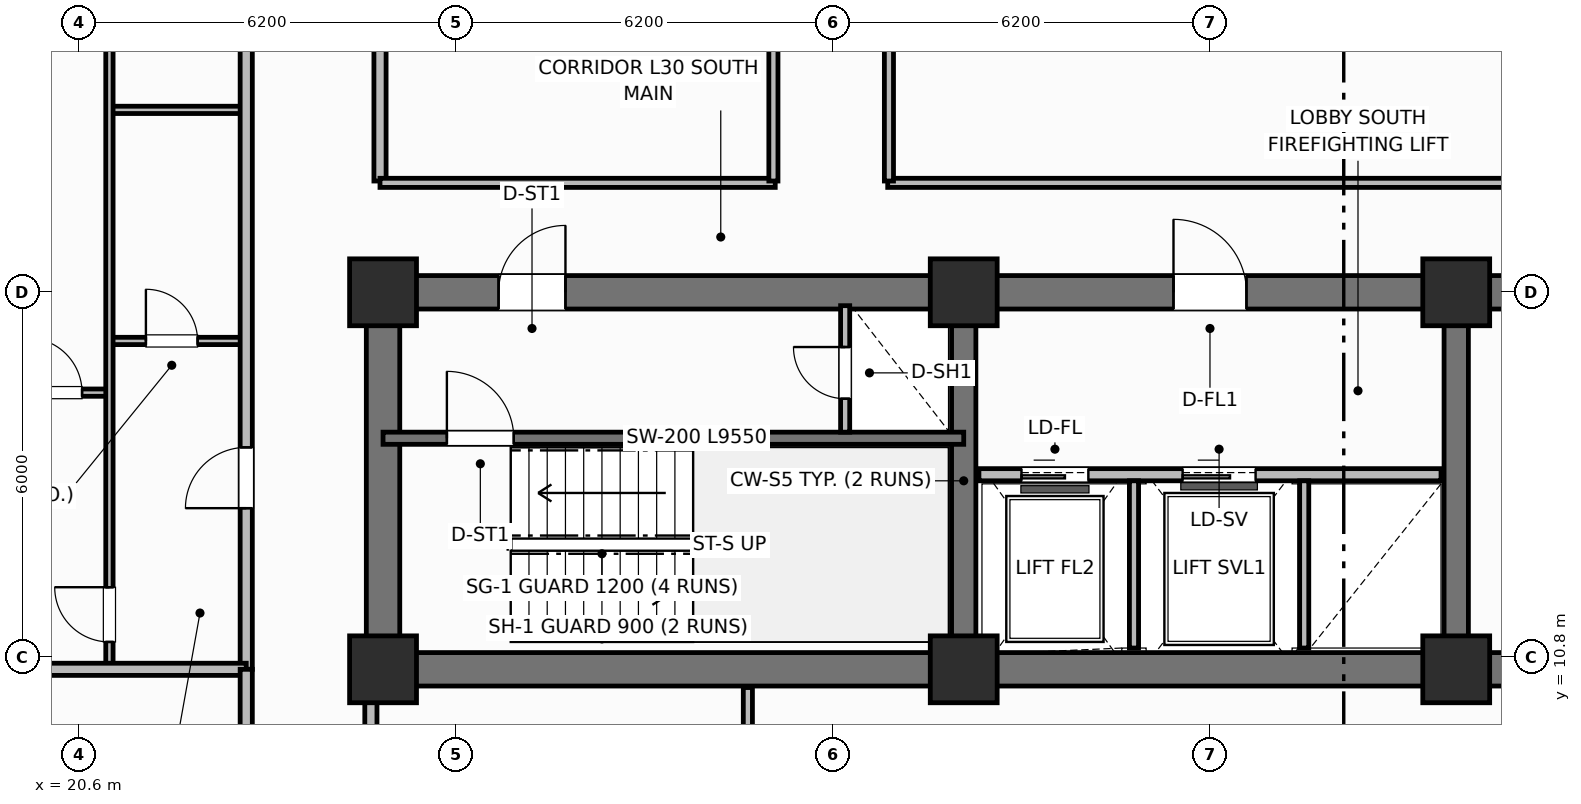
"""IFC4 building model, lengths in metres.
Left out: names, types, materials, properties, quantities, classifications, styles, units other than length and angle.
Written with IfcOpenShell. Run it as: python <this file> out.ifc"""

import sys

from ifc_helpers import new_model, si_unit, direction, frame, frame_2d, origin, origin_2d, place, context, subcontext, project, spatial, rectangle, extrude, element, fill, save


model = new_model("IFC4")
c1 = context("Model", 3, precision=1e-05, world=origin(), true_north=direction((0.0, 1.0)))
c2 = subcontext(c1, "Body", "Model", "MODEL_VIEW")
j1 = project(units=[si_unit("LENGTHUNIT", "METRE"), si_unit("PLANEANGLEUNIT", "RADIAN")], contexts=[c1])
p1 = place(None, origin())
s1 = spatial("IfcSite", under=j1, at=p1, CompositionType="ELEMENT")
p2 = place(p1, origin())
s2 = spatial("IfcBuilding", under=s1, at=p2, CompositionType="ELEMENT")
p3 = place(p2, frame((0.0, 0.0, 121.6)))
s3 = spatial("IfcBuildingStorey", under=s2, at=p3, CompositionType="ELEMENT", Elevation=121.6)
p4 = place(p3, frame((52.8, 10.6, 0.0), z_axis=(0.0, 0.0, 1.0), x_axis=(-1.0, 0.0, 0.0)))
e1 = element("IfcWall", 1, at=p4, inside=s3, PredefinedType="SHEAR", context=c2, shape_type="SweptSolid", body=[
    extrude(rectangle(XDim=27.2, YDim=0.55, at=frame_2d((13.6, 0.0))), origin(), (0.0, 0.0, 1.0), 3.7),
])
p5 = place(p3, frame((25.6, 10.875, 0.0), z_axis=(0.0, 0.0, 1.0), x_axis=(0.0, 1.0, 0.0)))
e2 = element("IfcWall", 2, at=p5, inside=s3, PredefinedType="SHEAR", context=c2, shape_type="SweptSolid", body=[
    extrude(rectangle(XDim=5.65, YDim=0.55, at=frame_2d((2.825, 0.0))), origin(), (0.0, 0.0, 1.0), 3.7),
])
p6 = place(p3, frame((25.6, 16.8, 0.0), z_axis=(0.0, 0.0, 1.0), x_axis=(1.0, 0.0, 0.0)))
e3 = element("IfcWall", 3, at=p6, inside=s3, PredefinedType="SHEAR", context=c2, shape_type="SweptSolid", body=[
    extrude(rectangle(XDim=27.2, YDim=0.55, at=frame_2d((13.6, 0.0))), origin(), (0.0, 0.0, 1.0), 3.7),
])
p7 = place(p6, frame((1.9, 0.0, 0.0)))
e4 = element("IfcOpeningElement", 4, at=p7, cuts=e3, PredefinedType="OPENING", context=c2, shape_type="SweptSolid", body=[
    extrude(rectangle(XDim=1.1, YDim=2.15, at=frame_2d((0.55, 1.075))), frame((0.0, 0.285, 0.0), z_axis=(0.0, -1.0, 0.0), x_axis=(1.0, 0.0, 0.0)), (0.0, 0.0, 1.0), 0.57),
])
p8 = place(p6, frame((13.0, 0.0, 0.0)))
e5 = element("IfcOpeningElement", 5, at=p8, cuts=e3, PredefinedType="OPENING", context=c2, shape_type="SweptSolid", body=[
    extrude(rectangle(XDim=1.2, YDim=2.15, at=frame_2d((0.6, 1.075))), frame((0.0, 0.285, 0.0), z_axis=(0.0, -1.0, 0.0), x_axis=(1.0, 0.0, 0.0)), (0.0, 0.0, 1.0), 0.57),
])
p9 = place(p6, frame((21.6, 0.0, 0.0)))
e6 = element("IfcOpeningElement", 6, at=p9, cuts=e3, PredefinedType="OPENING", context=c2, shape_type="SweptSolid", body=[
    extrude(rectangle(XDim=1.0, YDim=2.15, at=frame_2d((0.5, 1.075))), frame((0.0, 0.285, 0.0), z_axis=(0.0, -1.0, 0.0), x_axis=(1.0, 0.0, 0.0)), (0.0, 0.0, 1.0), 0.57),
])
for number, where, z_axis, x_axis in (
    (7, (35.15, 10.875, 0.0), (0.0, 0.0, 1.0), (0.0, 1.0, 0.0)),
    (8, (43.25, 10.875, 0.0), (0.0, 0.0, 1.0), (0.0, 1.0, 0.0)),
):
    element("IfcWall", number, at=place(p3, frame(where, z_axis=z_axis, x_axis=x_axis)), inside=s3, PredefinedType="SHEAR", context=c2, shape_type="SweptSolid", body=[
        extrude(rectangle(XDim=5.65, YDim=0.4, at=frame_2d((2.825, 0.0))), origin(), (0.0, 0.0, 1.0), 3.7),
    ])
for number, where, z_axis, x_axis in (
    (9, (25.6, 10.6, 0.0), (0.0, 0.0, 1.0), (1.0, 0.0, 0.0)),
    (10, (25.6, 16.8, 0.0), (0.0, 0.0, 1.0), (1.0, 0.0, 0.0)),
    (11, (35.15, 10.6, 0.0), (0.0, 0.0, 1.0), (1.0, 0.0, 0.0)),
    (12, (35.15, 16.8, 0.0), (0.0, 0.0, 1.0), (1.0, 0.0, 0.0)),
    (13, (43.25, 10.6, 0.0), (0.0, 0.0, 1.0), (1.0, 0.0, 0.0)),
    (14, (43.25, 16.8, 0.0), (0.0, 0.0, 1.0), (1.0, 0.0, 0.0)),
):
    element("IfcColumn", number, at=place(p3, frame(where, z_axis=z_axis, x_axis=x_axis)), inside=s3, PredefinedType="COLUMN", context=c2, shape_type="SweptSolid", body=[
        extrude(rectangle(XDim=1.1, YDim=1.1, at=origin_2d()), origin(), (0.0, 0.0, 1.0), 3.7),
    ])
p10 = place(p3, frame((25.6, 14.4, 0.0), z_axis=(0.0, 0.0, 1.0), x_axis=(1.0, 0.0, 0.0)))
e15 = element("IfcWall", 15, at=p10, inside=s3, PredefinedType="SHEAR", context=c2, shape_type="SweptSolid", body=[
    extrude(rectangle(XDim=9.55, YDim=0.2, at=frame_2d((4.775, 0.0))), origin(), (0.0, 0.0, 1.0), 3.7),
])
p11 = place(p10, frame((1.05, 0.0, 0.0)))
e16 = element("IfcOpeningElement", 16, at=p11, cuts=e15, PredefinedType="OPENING", context=c2, shape_type="SweptSolid", body=[
    extrude(rectangle(XDim=1.1, YDim=2.15, at=frame_2d((0.55, 1.075))), frame((0.0, 0.11, 0.0), z_axis=(0.0, -1.0, 0.0), x_axis=(1.0, 0.0, 0.0)), (0.0, 0.0, 1.0), 0.22),
])
p12 = place(p3, frame((33.2, 14.5, 0.0), z_axis=(0.0, 0.0, 1.0), x_axis=(0.0, 1.0, 0.0)))
e17 = element("IfcWall", 17, at=p12, inside=s3, PredefinedType="PARTITIONING", context=c2, shape_type="SweptSolid", body=[
    extrude(rectangle(XDim=2.08, YDim=0.15, at=frame_2d((1.04, 0.0))), origin(), (0.0, 0.0, 1.0), 2.53),
])
p13 = place(p12, frame((0.55, 0.0, 0.0)))
e18 = element("IfcOpeningElement", 18, at=p13, cuts=e17, PredefinedType="OPENING", context=c2, shape_type="SweptSolid", body=[
    extrude(rectangle(XDim=0.85, YDim=2.05, at=frame_2d((0.425, 1.025))), frame((0.0, 0.085, 0.0), z_axis=(0.0, -1.0, 0.0), x_axis=(1.0, 0.0, 0.0)), (0.0, 0.0, 1.0), 0.17),
])
p14 = place(p3, frame((35.4, 13.8, 0.0), z_axis=(0.0, 0.0, 1.0), x_axis=(1.0, 0.0, 0.0)))
e19 = element("IfcWall", 19, at=p14, inside=s3, PredefinedType="PARTITIONING", context=c2, shape_type="SweptSolid", body=[
    extrude(rectangle(XDim=7.6, YDim=0.2, at=frame_2d((3.8, 0.0))), origin(), (0.0, 0.0, 1.0), 2.3),
])
p15 = place(p14, frame((0.7, 0.0, 0.0)))
e20 = element("IfcOpeningElement", 20, at=p15, cuts=e19, PredefinedType="OPENING", context=c2, shape_type="SweptSolid", body=[
    extrude(rectangle(XDim=1.1, YDim=2.15, at=frame_2d((0.55, 1.075))), frame((0.0, 0.11, 0.0), z_axis=(0.0, -1.0, 0.0), x_axis=(1.0, 0.0, 0.0)), (0.0, 0.0, 1.0), 0.22),
])
p16 = place(p14, frame((3.35, 0.0, 0.0)))
e21 = element("IfcOpeningElement", 21, at=p16, cuts=e19, PredefinedType="OPENING", context=c2, shape_type="SweptSolid", body=[
    extrude(rectangle(XDim=1.2, YDim=2.15, at=frame_2d((0.6, 1.075))), frame((0.0, 0.11, 0.0), z_axis=(0.0, -1.0, 0.0), x_axis=(1.0, 0.0, 0.0)), (0.0, 0.0, 1.0), 0.22),
])
for number, where, z_axis, x_axis in (
    (22, (37.95, 10.95, 0.0), (0.0, 0.0, 1.0), (0.0, 1.0, 0.0)),
    (23, (40.75, 10.95, 0.0), (0.0, 0.0, 1.0), (0.0, 1.0, 0.0)),
):
    element("IfcWall", number, at=place(p3, frame(where, z_axis=z_axis, x_axis=x_axis)), inside=s3, PredefinedType="PARTITIONING", context=c2, shape_type="SweptSolid", body=[
        extrude(rectangle(XDim=2.75, YDim=0.15, at=frame_2d((1.375, 0.0))), origin(), (0.0, 0.0, 1.0), 2.53),
    ])
p17 = place(p3, frame((25.55, 18.63, 0.0), z_axis=(0.0, 0.0, 1.0), x_axis=(0.0, 1.0, 0.0)))
e24 = element("IfcWall", 24, at=p17, inside=s3, PredefinedType="PARTITIONING", context=c2, shape_type="SweptSolid", body=[
    extrude(rectangle(XDim=19.14, YDim=0.2, at=frame_2d((9.57, 0.0))), origin(), (0.0, 0.0, 1.0), 2.53),
])
p18 = place(p3, frame((25.55, 18.6, 0.0), z_axis=(0.0, 0.0, 1.0), x_axis=(1.0, 0.0, 0.0)))
e25 = element("IfcWall", 25, at=p18, inside=s3, PredefinedType="PARTITIONING", context=c2, shape_type="SweptSolid", body=[
    extrude(rectangle(XDim=6.5, YDim=0.15, at=frame_2d((3.25, 0.0))), origin(), (0.0, 0.0, 1.0), 2.53),
])
p19 = place(p3, frame((33.9, 18.6, 0.0), z_axis=(0.0, 0.0, 1.0), x_axis=(1.0, 0.0, 0.0)))
e26 = element("IfcWall", 26, at=p19, inside=s3, PredefinedType="PARTITIONING", context=c2, shape_type="SweptSolid", body=[
    extrude(rectangle(XDim=10.6, YDim=0.15, at=frame_2d((5.3, 0.0))), origin(), (0.0, 0.0, 1.0), 2.53),
])
p20 = place(p3, frame((32.02, 18.63, 0.0), z_axis=(0.0, 0.0, 1.0), x_axis=(0.0, 1.0, 0.0)))
e27 = element("IfcWall", 27, at=p20, inside=s3, PredefinedType="PARTITIONING", context=c2, shape_type="SweptSolid", body=[
    extrude(rectangle(XDim=19.14, YDim=0.15, at=frame_2d((9.57, 0.0))), origin(), (0.0, 0.0, 1.0), 2.53),
])
p21 = place(p20, frame((5.0, 0.0, 0.0)))
e28 = element("IfcOpeningElement", 28, at=p21, cuts=e27, PredefinedType="OPENING", context=c2, shape_type="SweptSolid", body=[
    extrude(rectangle(XDim=0.9, YDim=2.1, at=frame_2d((0.45, 1.05))), frame((0.0, 0.085, 0.0), z_axis=(0.0, -1.0, 0.0), x_axis=(1.0, 0.0, 0.0)), (0.0, 0.0, 1.0), 0.17),
])
p22 = place(p3, frame((33.92, 18.63, 0.0), z_axis=(0.0, 0.0, 1.0), x_axis=(0.0, 1.0, 0.0)))
e29 = element("IfcWall", 29, at=p22, inside=s3, PredefinedType="PARTITIONING", context=c2, shape_type="SweptSolid", body=[
    extrude(rectangle(XDim=19.14, YDim=0.15, at=frame_2d((9.57, 0.0))), origin(), (0.0, 0.0, 1.0), 2.53),
])
p23 = place(p22, frame((6.5, 0.0, 0.0)))
e30 = element("IfcOpeningElement", 30, at=p23, cuts=e29, PredefinedType="OPENING", context=c2, shape_type="SweptSolid", body=[
    extrude(rectangle(XDim=1.0, YDim=2.15, at=frame_2d((0.5, 1.075))), frame((0.0, 0.085, 0.0), z_axis=(0.0, -1.0, 0.0), x_axis=(1.0, 0.0, 0.0)), (0.0, 0.0, 1.0), 0.17),
])
p24 = place(p3, frame((21.1, 16.0, 0.0), z_axis=(0.0, 0.0, 1.0), x_axis=(1.0, 0.0, 0.0)))
e31 = element("IfcWall", 31, at=p24, inside=s3, PredefinedType="PARTITIONING", context=c2, shape_type="SweptSolid", body=[
    extrude(rectangle(XDim=2.25, YDim=0.12, at=frame_2d((1.125, 0.0))), origin(), (0.0, 0.0, 1.0), 2.53),
])
p25 = place(p24, frame((0.6, 0.0, 0.0)))
e32 = element("IfcOpeningElement", 32, at=p25, cuts=e31, PredefinedType="OPENING", context=c2, shape_type="SweptSolid", body=[
    extrude(rectangle(XDim=0.85, YDim=2.1, at=frame_2d((0.425, 1.05))), frame((0.0, 0.07, 0.0), z_axis=(0.0, -1.0, 0.0), x_axis=(1.0, 0.0, 0.0)), (0.0, 0.0, 1.0), 0.14),
])
p26 = place(p3, frame((21.1, 19.8, 0.0), z_axis=(0.0, 0.0, 1.0), x_axis=(1.0, 0.0, 0.0)))
e33 = element("IfcWall", 33, at=p26, inside=s3, PredefinedType="PARTITIONING", context=c2, shape_type="SweptSolid", body=[
    extrude(rectangle(XDim=2.25, YDim=0.12, at=frame_2d((1.125, 0.0))), origin(), (0.0, 0.0, 1.0), 2.53),
])
p27 = place(p3, frame((14.57, 15.15, 0.0), z_axis=(0.0, 0.0, 1.0), x_axis=(1.0, 0.0, 0.0)))
e34 = element("IfcWall", 34, at=p27, inside=s3, PredefinedType="PARTITIONING", context=c2, shape_type="SweptSolid", body=[
    extrude(rectangle(XDim=6.53, YDim=0.12, at=frame_2d((3.265, 0.0))), origin(), (0.0, 0.0, 1.0), 2.53),
])
p28 = place(p27, frame((5.18, 0.0, 0.0)))
e35 = element("IfcOpeningElement", 35, at=p28, cuts=e34, PredefinedType="OPENING", context=c2, shape_type="SweptSolid", body=[
    extrude(rectangle(XDim=0.9, YDim=2.1, at=frame_2d((0.45, 1.05))), frame((0.0, 0.07, 0.0), z_axis=(0.0, -1.0, 0.0), x_axis=(1.0, 0.0, 0.0)), (0.0, 0.0, 1.0), 0.14),
])
p29 = place(p3, frame((21.1, 10.64, 0.0), z_axis=(0.0, 0.0, 1.0), x_axis=(0.0, 1.0, 0.0)))
e36 = element("IfcWall", 36, at=p29, inside=s3, PredefinedType="PARTITIONING", context=c2, shape_type="SweptSolid", body=[
    extrude(rectangle(XDim=15.92, YDim=0.12, at=frame_2d((7.96, 0.0))), origin(), (0.0, 0.0, 1.0), 2.53),
])
p30 = place(p29, frame((0.41, 0.0, 0.0)))
e37 = element("IfcOpeningElement", 37, at=p30, cuts=e36, PredefinedType="OPENING", context=c2, shape_type="SweptSolid", body=[
    extrude(rectangle(XDim=0.9, YDim=2.1, at=frame_2d((0.45, 1.05))), frame((0.0, 0.07, 0.0), z_axis=(0.0, -1.0, 0.0), x_axis=(1.0, 0.0, 0.0)), (0.0, 0.0, 1.0), 0.14),
])
p31 = place(p29, frame((13.125, 0.0, 0.0)))
e38 = element("IfcOpeningElement", 38, at=p31, cuts=e36, PredefinedType="OPENING", context=c2, shape_type="SweptSolid", body=[
    extrude(rectangle(XDim=0.82, YDim=2.08, at=frame_2d((0.41, 1.04))), frame((0.0, 0.07, 0.0), z_axis=(0.0, -1.0, 0.0), x_axis=(1.0, 0.0, 0.0)), (0.0, 0.0, 1.0), 0.14),
])
p32 = place(p3, frame((23.35, 10.6, 0.0), z_axis=(0.0, 0.0, 1.0), x_axis=(0.0, 1.0, 0.0)))
e39 = element("IfcWall", 39, at=p32, inside=s3, PredefinedType="PARTITIONING", context=c2, shape_type="SweptSolid", body=[
    extrude(rectangle(XDim=35.2, YDim=0.2, at=frame_2d((17.6, 0.0))), origin(), (0.0, 0.0, 1.0), 2.53),
])
p33 = place(p32, frame((2.65, 0.0, 0.0)))
e40 = element("IfcOpeningElement", 40, at=p33, cuts=e39, PredefinedType="OPENING", context=c2, shape_type="SweptSolid", body=[
    extrude(rectangle(XDim=1.0, YDim=2.15, at=frame_2d((0.5, 1.075))), frame((0.0, 0.11, 0.0), z_axis=(0.0, -1.0, 0.0), x_axis=(1.0, 0.0, 0.0)), (0.0, 0.0, 1.0), 0.22),
])
p34 = place(p32, frame((19.95, 0.0, 0.0)))
e41 = element("IfcOpeningElement", 41, at=p34, cuts=e39, PredefinedType="OPENING", context=c2, shape_type="SweptSolid", body=[
    extrude(rectangle(XDim=1.0, YDim=2.15, at=frame_2d((0.5, 1.075))), frame((0.0, 0.11, 0.0), z_axis=(0.0, -1.0, 0.0), x_axis=(1.0, 0.0, 0.0)), (0.0, 0.0, 1.0), 0.22),
])
p35 = place(p3, frame((14.99, 10.6, 0.0), z_axis=(0.0, 0.0, 1.0), x_axis=(1.0, 0.0, 0.0)))
e42 = element("IfcWall", 42, at=p35, inside=s3, PredefinedType="PARTITIONING", context=c2, shape_type="SweptSolid", body=[
    extrude(rectangle(XDim=8.36, YDim=0.2, at=frame_2d((4.18, 0.0))), origin(), (0.0, 0.0, 1.0), 2.53),
])
p36 = place(p3, frame((23.35, 4.97, 0.0), z_axis=(0.0, 0.0, 1.0), x_axis=(0.0, 1.0, 0.0)))
e43 = element("IfcWall", 43, at=p36, inside=s3, PredefinedType="PARTITIONING", context=c2, shape_type="SweptSolid", body=[
    extrude(rectangle(XDim=5.63, YDim=0.2, at=frame_2d((2.815, 0.0))), origin(), (0.0, 0.0, 1.0), 2.53),
])
p37 = place(p3, frame((31.6, 4.97, 0.0), z_axis=(0.0, 0.0, 1.0), x_axis=(0.0, 1.0, 0.0)))
e44 = element("IfcWall", 44, at=p37, inside=s3, PredefinedType="PARTITIONING", context=c2, shape_type="SweptSolid", body=[
    extrude(rectangle(XDim=5.33, YDim=0.15, at=frame_2d((2.665, 0.0))), origin(), (0.0, 0.0, 1.0), 2.53),
])
p38 = place(p37, frame((1.45, 0.0, 0.0)))
e45 = element("IfcOpeningElement", 45, at=p38, cuts=e44, PredefinedType="OPENING", context=c2, shape_type="SweptSolid", body=[
    extrude(rectangle(XDim=0.9, YDim=2.1, at=frame_2d((0.45, 1.05))), frame((0.0, 0.085, 0.0), z_axis=(0.0, -1.0, 0.0), x_axis=(1.0, 0.0, 0.0)), (0.0, 0.0, 1.0), 0.17),
])
p39 = place(p3, frame((25.4, 5.77, 0.0), z_axis=(0.0, 0.0, 1.0), x_axis=(0.0, 1.0, 0.0)))
e46 = element("IfcWall", 46, at=p39, inside=s3, PredefinedType="PARTITIONING", context=c2, shape_type="SweptSolid", body=[
    extrude(rectangle(XDim=4.53, YDim=0.2, at=frame_2d((2.265, 0.0))), origin(), (0.0, 0.0, 1.0), 2.53),
])
p40 = place(p39, frame((1.05, 0.0, 0.0)))
e47 = element("IfcOpeningElement", 47, at=p40, cuts=e46, PredefinedType="OPENING", context=c2, shape_type="SweptSolid", body=[
    extrude(rectangle(XDim=0.9, YDim=2.1, at=frame_2d((0.45, 1.05))), frame((0.0, 0.11, 0.0), z_axis=(0.0, -1.0, 0.0), x_axis=(1.0, 0.0, 0.0)), (0.0, 0.0, 1.0), 0.22),
])
p41 = place(p11, origin())
e48 = element("IfcDoor", 48, at=p41, inside=s3, OperationType="SINGLE_SWING_LEFT", PredefinedType="DOOR", context=c2, shape_type="SweptSolid", body=[
    extrude(rectangle(XDim=1.1, YDim=2.15, at=frame_2d((0.55, 1.075))), frame((0.0, 0.025, 0.0), z_axis=(0.0, -1.0, 0.0), x_axis=(1.0, 0.0, 0.0)), (0.0, 0.0, 1.0), 0.05),
])
fill(e16, e48)
p42 = place(p13, origin())
e49 = element("IfcDoor", 49, at=p42, inside=s3, OperationType="SINGLE_SWING_RIGHT", PredefinedType="TRAPDOOR", context=c2, shape_type="SweptSolid", body=[
    extrude(rectangle(XDim=0.85, YDim=2.05, at=frame_2d((0.425, 1.025))), frame((0.0, 0.025, 0.0), z_axis=(0.0, -1.0, 0.0), x_axis=(1.0, 0.0, 0.0)), (0.0, 0.0, 1.0), 0.05),
])
fill(e18, e49)
p43 = place(p15, origin())
e50 = element("IfcDoor", 50, at=p43, inside=s3, OperationType="SLIDING_TO_LEFT", PredefinedType="DOOR", context=c2, shape_type="SweptSolid", body=[
    extrude(rectangle(XDim=1.1, YDim=2.15, at=frame_2d((0.55, 1.075))), frame((0.0, 0.025, 0.0), z_axis=(0.0, -1.0, 0.0), x_axis=(1.0, 0.0, 0.0)), (0.0, 0.0, 1.0), 0.05),
])
fill(e20, e50)
p44 = place(p16, origin())
e51 = element("IfcDoor", 51, at=p44, inside=s3, OperationType="SLIDING_TO_LEFT", PredefinedType="DOOR", context=c2, shape_type="SweptSolid", body=[
    extrude(rectangle(XDim=1.2, YDim=2.15, at=frame_2d((0.6, 1.075))), frame((0.0, 0.025, 0.0), z_axis=(0.0, -1.0, 0.0), x_axis=(1.0, 0.0, 0.0)), (0.0, 0.0, 1.0), 0.05),
])
fill(e21, e51)
p45 = place(p25, origin())
e52 = element("IfcDoor", 52, at=p45, inside=s3, OperationType="SINGLE_SWING_LEFT", PredefinedType="DOOR", context=c2, shape_type="SweptSolid", body=[
    extrude(rectangle(XDim=0.85, YDim=2.1, at=frame_2d((0.425, 1.05))), frame((0.0, 0.025, 0.0), z_axis=(0.0, -1.0, 0.0), x_axis=(1.0, 0.0, 0.0)), (0.0, 0.0, 1.0), 0.05),
])
fill(e32, e52)
p46 = place(p28, origin())
e53 = element("IfcDoor", 53, at=p46, inside=s3, OperationType="SINGLE_SWING_LEFT", PredefinedType="DOOR", context=c2, shape_type="SweptSolid", body=[
    extrude(rectangle(XDim=0.9, YDim=2.1, at=frame_2d((0.45, 1.05))), frame((0.0, 0.025, 0.0), z_axis=(0.0, -1.0, 0.0), x_axis=(1.0, 0.0, 0.0)), (0.0, 0.0, 1.0), 0.05),
])
fill(e35, e53)
p47 = place(p30, origin())
e54 = element("IfcDoor", 54, at=p47, inside=s3, OperationType="SINGLE_SWING_RIGHT", PredefinedType="DOOR", context=c2, shape_type="SweptSolid", body=[
    extrude(rectangle(XDim=0.9, YDim=2.1, at=frame_2d((0.45, 1.05))), frame((0.0, 0.025, 0.0), z_axis=(0.0, -1.0, 0.0), x_axis=(1.0, 0.0, 0.0)), (0.0, 0.0, 1.0), 0.05),
])
fill(e37, e54)
p48 = place(p33, origin())
e55 = element("IfcDoor", 55, at=p48, inside=s3, OperationType="SINGLE_SWING_LEFT", PredefinedType="DOOR", context=c2, shape_type="SweptSolid", body=[
    extrude(rectangle(XDim=1.0, YDim=2.15, at=frame_2d((0.5, 1.075))), frame((0.0, 0.025, 0.0), z_axis=(0.0, -1.0, 0.0), x_axis=(1.0, 0.0, 0.0)), (0.0, 0.0, 1.0), 0.05),
])
fill(e40, e55)
p49 = place(p7, origin())
e56 = element("IfcDoor", 56, at=p49, inside=s3, OperationType="SINGLE_SWING_RIGHT", PredefinedType="DOOR", context=c2, shape_type="SweptSolid", body=[
    extrude(rectangle(XDim=1.1, YDim=2.15, at=frame_2d((0.55, 1.075))), frame((0.0, 0.025, 0.0), z_axis=(0.0, -1.0, 0.0), x_axis=(1.0, 0.0, 0.0)), (0.0, 0.0, 1.0), 0.05),
])
fill(e4, e56)
p50 = place(p8, origin())
e57 = element("IfcDoor", 57, at=p50, inside=s3, OperationType="SINGLE_SWING_LEFT", PredefinedType="DOOR", context=c2, shape_type="SweptSolid", body=[
    extrude(rectangle(XDim=1.2, YDim=2.15, at=frame_2d((0.6, 1.075))), frame((0.0, 0.025, 0.0), z_axis=(0.0, -1.0, 0.0), x_axis=(1.0, 0.0, 0.0)), (0.0, 0.0, 1.0), 0.05),
])
fill(e5, e57)
save(model, sys.argv[1])
